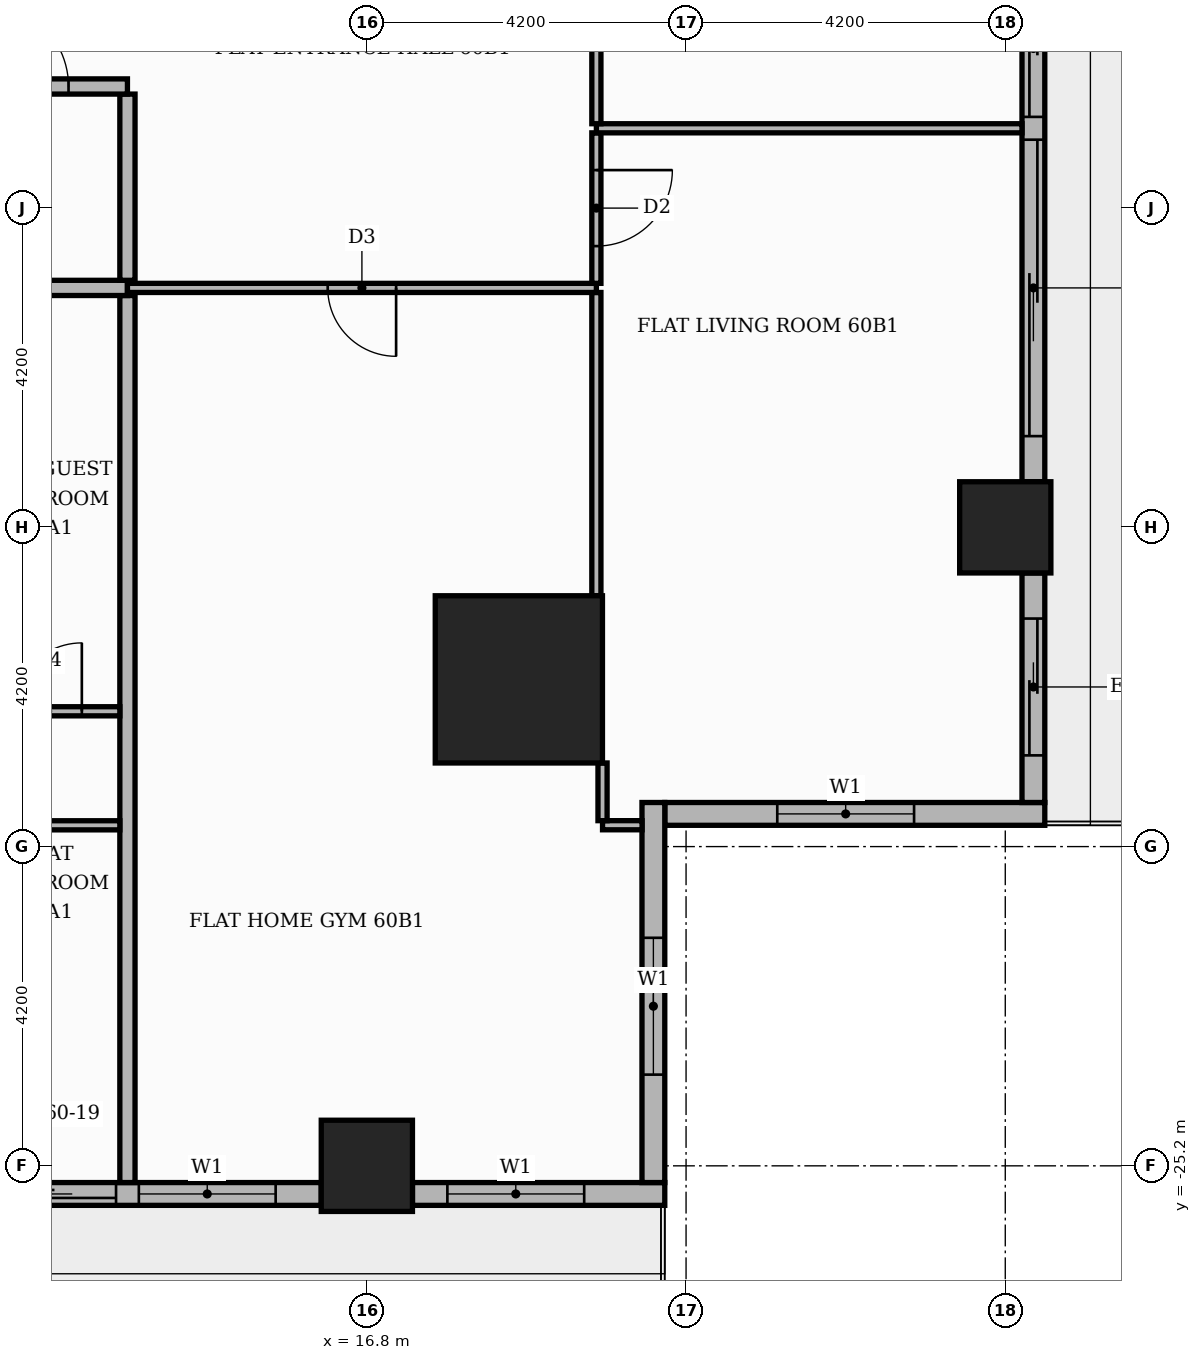
"""IFC4 building model, lengths in metres.
Left out: names, types, materials, properties, quantities, classifications, styles, units other than length and angle.
Written with IfcOpenShell. Run it as: python <this file> out.ifc"""

import sys

from ifc_helpers import new_model, si_unit, direction, frame, frame_2d, origin, origin_2d, place, context, subcontext, project, spatial, rectangle, extrude, element, fill, save


model = new_model("IFC4")
c1 = context("Model", 3, precision=1e-05, world=origin(), true_north=direction((0.0, 1.0)))
c2 = subcontext(c1, "Body", "Model", "MODEL_VIEW")
j1 = project(units=[si_unit("LENGTHUNIT", "METRE"), si_unit("PLANEANGLEUNIT", "RADIAN")], contexts=[c1])
p1 = place(None, origin())
s1 = spatial("IfcSite", under=j1, at=p1, CompositionType="ELEMENT")
p2 = place(p1, origin())
s2 = spatial("IfcBuilding", under=s1, at=p2, CompositionType="ELEMENT")
p3 = place(p2, frame((0.0, 0.0, 252.3)))
s3 = spatial("IfcBuildingStorey", under=s2, at=p3, CompositionType="ELEMENT", Elevation=252.3)
p4 = place(p3, frame((18.8, -18.8, 0.0), z_axis=(0.0, 0.0, 1.0), x_axis=(1.0, 0.0, 0.0)))
e1 = element("IfcColumn", 1, at=p4, inside=s3, PredefinedType="COLUMN", context=c2, shape_type="SweptSolid", body=[
    extrude(rectangle(XDim=2.2, YDim=2.2, at=origin_2d()), origin(), (0.0, 0.0, 1.0), 3.9),
])
for number, where, z_axis, x_axis in (
    (2, (25.2, -16.8, 0.0), (0.0, 0.0, 1.0), (1.0, 0.0, 0.0)),
    (3, (16.8, -25.2, 0.0), (0.0, 0.0, 1.0), (1.0, 0.0, 0.0)),
):
    element("IfcColumn", number, at=place(p3, frame(where, z_axis=z_axis, x_axis=x_axis)), inside=s3, PredefinedType="COLUMN", context=c2, shape_type="SweptSolid", body=[
        extrude(rectangle(XDim=1.2, YDim=1.2, at=origin_2d()), origin(), (0.0, 0.0, 1.0), 3.9),
    ])
p5 = place(p3, frame((20.72, -20.57, 0.0), z_axis=(0.0, 0.0, 1.0), x_axis=(1.0, 0.0, 0.0)))
e4 = element("IfcWall", 4, at=p5, inside=s3, PredefinedType="STANDARD", context=c2, shape_type="SweptSolid", body=[
    extrude(rectangle(XDim=5.0, YDim=0.3, at=frame_2d((2.5, 0.0))), origin(), (0.0, 0.0, 1.0), 3.48),
])
p6 = place(p5, frame((1.48, 0.0, 0.9)))
e5 = element("IfcOpeningElement", 5, at=p6, cuts=e4, PredefinedType="OPENING", context=c2, shape_type="SweptSolid", body=[
    extrude(rectangle(XDim=1.8, YDim=2.1, at=frame_2d((0.9, 1.05))), frame((0.0, 0.16, 0.0), z_axis=(0.0, -1.0, 0.0), x_axis=(1.0, 0.0, 0.0)), (0.0, 0.0, 1.0), 0.32),
])
p7 = place(p3, frame((25.57, -20.42, 0.0), z_axis=(0.0, 0.0, 1.0), x_axis=(0.0, 1.0, 0.0)))
e6 = element("IfcWall", 6, at=p7, inside=s3, PredefinedType="STANDARD", context=c2, shape_type="SweptSolid", body=[
    extrude(rectangle(XDim=3.02, YDim=0.3, at=frame_2d((1.51, 0.0))), origin(), (0.0, 0.0, 1.0), 3.48),
])
p8 = place(p7, frame((0.62, 0.0, 0.0)))
e7 = element("IfcOpeningElement", 7, at=p8, cuts=e6, PredefinedType="OPENING", context=c2, shape_type="SweptSolid", body=[
    extrude(rectangle(XDim=1.8, YDim=2.4, at=frame_2d((0.9, 1.2))), frame((0.0, 0.16, 0.0), z_axis=(0.0, -1.0, 0.0), x_axis=(1.0, 0.0, 0.0)), (0.0, 0.0, 1.0), 0.32),
])
p9 = place(p3, frame((25.57, -16.2, 0.0), z_axis=(0.0, 0.0, 1.0), x_axis=(0.0, 1.0, 0.0)))
e8 = element("IfcWall", 8, at=p9, inside=s3, PredefinedType="STANDARD", context=c2, shape_type="SweptSolid", body=[
    extrude(rectangle(XDim=7.2, YDim=0.3, at=frame_2d((3.6, 0.0))), origin(), (0.0, 0.0, 1.0), 3.48),
])
p10 = place(p9, frame((0.6, 0.0, 0.0)))
e9 = element("IfcOpeningElement", 9, at=p10, cuts=e8, PredefinedType="OPENING", context=c2, shape_type="SweptSolid", body=[
    extrude(rectangle(XDim=3.9, YDim=2.4, at=frame_2d((1.95, 1.2))), frame((0.0, 0.16, 0.0), z_axis=(0.0, -1.0, 0.0), x_axis=(1.0, 0.0, 0.0)), (0.0, 0.0, 1.0), 0.32),
])
p11 = place(p9, frame((4.8, 0.0, 0.0)))
e10 = element("IfcOpeningElement", 10, at=p11, cuts=e8, PredefinedType="OPENING", context=c2, shape_type="SweptSolid", body=[
    extrude(rectangle(XDim=1.8, YDim=2.4, at=frame_2d((0.9, 1.2))), frame((0.0, 0.16, 0.0), z_axis=(0.0, -1.0, 0.0), x_axis=(1.0, 0.0, 0.0)), (0.0, 0.0, 1.0), 0.32),
])
p12 = place(p3, frame((9.0, -25.57, 0.0), z_axis=(0.0, 0.0, 1.0), x_axis=(1.0, 0.0, 0.0)))
e11 = element("IfcWall", 11, at=p12, inside=s3, PredefinedType="STANDARD", context=c2, shape_type="SweptSolid", body=[
    extrude(rectangle(XDim=7.2, YDim=0.3, at=frame_2d((3.6, 0.0))), origin(), (0.0, 0.0, 1.0), 3.48),
])
p13 = place(p12, frame((0.6, 0.0, 0.9)))
e12 = element("IfcOpeningElement", 12, at=p13, cuts=e11, PredefinedType="OPENING", context=c2, shape_type="SweptSolid", body=[
    extrude(rectangle(XDim=1.8, YDim=2.1, at=frame_2d((0.9, 1.05))), frame((0.0, 0.16, 0.0), z_axis=(0.0, -1.0, 0.0), x_axis=(1.0, 0.0, 0.0)), (0.0, 0.0, 1.0), 0.32),
])
p14 = place(p12, frame((2.7, 0.0, 0.0)))
e13 = element("IfcOpeningElement", 13, at=p14, cuts=e11, PredefinedType="OPENING", context=c2, shape_type="SweptSolid", body=[
    extrude(rectangle(XDim=1.8, YDim=2.4, at=frame_2d((0.9, 1.2))), frame((0.0, 0.16, 0.0), z_axis=(0.0, -1.0, 0.0), x_axis=(1.0, 0.0, 0.0)), (0.0, 0.0, 1.0), 0.32),
])
p15 = place(p12, frame((4.8, 0.0, 0.9)))
e14 = element("IfcOpeningElement", 14, at=p15, cuts=e11, PredefinedType="OPENING", context=c2, shape_type="SweptSolid", body=[
    extrude(rectangle(XDim=1.8, YDim=2.1, at=frame_2d((0.9, 1.05))), frame((0.0, 0.16, 0.0), z_axis=(0.0, -1.0, 0.0), x_axis=(1.0, 0.0, 0.0)), (0.0, 0.0, 1.0), 0.32),
])
p16 = place(p3, frame((17.4, -25.57, 0.0), z_axis=(0.0, 0.0, 1.0), x_axis=(1.0, 0.0, 0.0)))
e15 = element("IfcWall", 15, at=p16, inside=s3, PredefinedType="STANDARD", context=c2, shape_type="SweptSolid", body=[
    extrude(rectangle(XDim=3.32, YDim=0.3, at=frame_2d((1.66, 0.0))), origin(), (0.0, 0.0, 1.0), 3.48),
])
p17 = place(p16, frame((0.459, 0.0, 0.9)))
e16 = element("IfcOpeningElement", 16, at=p17, cuts=e15, PredefinedType="OPENING", context=c2, shape_type="SweptSolid", body=[
    extrude(rectangle(XDim=1.8, YDim=2.1, at=frame_2d((0.9, 1.05))), frame((0.0, 0.16, 0.0), z_axis=(0.0, -1.0, 0.0), x_axis=(1.0, 0.0, 0.0)), (0.0, 0.0, 1.0), 0.32),
])
p18 = place(p3, frame((20.57, -25.42, 0.0), z_axis=(0.0, 0.0, 1.0), x_axis=(0.0, 1.0, 0.0)))
e17 = element("IfcWall", 17, at=p18, inside=s3, PredefinedType="STANDARD", context=c2, shape_type="SweptSolid", body=[
    extrude(rectangle(XDim=5.0, YDim=0.3, at=frame_2d((2.5, 0.0))), origin(), (0.0, 0.0, 1.0), 3.48),
])
p19 = place(p18, frame((1.42, 0.0, 0.9)))
e18 = element("IfcOpeningElement", 18, at=p19, cuts=e17, PredefinedType="OPENING", context=c2, shape_type="SweptSolid", body=[
    extrude(rectangle(XDim=1.8, YDim=2.1, at=frame_2d((0.9, 1.05))), frame((0.0, 0.16, 0.0), z_axis=(0.0, -1.0, 0.0), x_axis=(1.0, 0.0, 0.0)), (0.0, 0.0, 1.0), 0.32),
])
p20 = place(p3, frame((13.65, -25.42, 0.0), z_axis=(0.0, 0.0, 1.0), x_axis=(0.0, 1.0, 0.0)))
e19 = element("IfcWall", 19, at=p20, inside=s3, PredefinedType="PARTITIONING", context=c2, shape_type="SweptSolid", body=[
    extrude(rectangle(XDim=11.67, YDim=0.2, at=frame_2d((5.835, 0.0))), origin(), (0.0, 0.0, 1.0), 3.48),
])
p21 = place(p3, frame((5.55, -20.72, 0.0), z_axis=(0.0, 0.0, 1.0), x_axis=(1.0, 0.0, 0.0)))
e20 = element("IfcWall", 20, at=p21, inside=s3, PredefinedType="PARTITIONING", context=c2, shape_type="SweptSolid", body=[
    extrude(rectangle(XDim=8.0, YDim=0.12, at=frame_2d((4.0, 0.0))), origin(), (0.0, 0.0, 1.0), 3.48),
])
p22 = place(p21, frame((2.4, 0.0, 0.0)))
e21 = element("IfcOpeningElement", 21, at=p22, cuts=e20, PredefinedType="OPENING", context=c2, shape_type="SweptSolid", body=[
    extrude(rectangle(XDim=0.9, YDim=2.1, at=frame_2d((0.45, 1.05))), frame((0.0, 0.07, 0.0), z_axis=(0.0, -1.0, 0.0), x_axis=(1.0, 0.0, 0.0)), (0.0, 0.0, 1.0), 0.14),
])
p23 = place(p3, frame((19.901, -20.719, 0.0), z_axis=(0.0, 0.0, 1.0), x_axis=(1.0, 0.0, 0.0)))
e22 = element("IfcWall", 22, at=p23, inside=s3, PredefinedType="PARTITIONING", context=c2, shape_type="SweptSolid", body=[
    extrude(rectangle(XDim=0.52, YDim=0.12, at=frame_2d((0.26, 0.0))), origin(), (0.0, 0.0, 1.0), 3.48),
])
p24 = place(p3, frame((19.901, -20.659, 0.0), z_axis=(0.0, 0.0, 1.0), x_axis=(0.0, 1.0, 0.0)))
e23 = element("IfcWall", 23, at=p24, inside=s3, PredefinedType="PARTITIONING", context=c2, shape_type="SweptSolid", body=[
    extrude(rectangle(XDim=0.759, YDim=0.12, at=frame_2d((0.379, 0.0))), origin(), (0.0, 0.0, 1.0), 3.48),
])
p25 = place(p3, frame((-7.35, -19.22, 0.0), z_axis=(0.0, 0.0, 1.0), x_axis=(1.0, 0.0, 0.0)))
e24 = element("IfcWall", 24, at=p25, inside=s3, PredefinedType="PARTITIONING", context=c2, shape_type="SweptSolid", body=[
    extrude(rectangle(XDim=20.9, YDim=0.12, at=frame_2d((10.45, 0.0))), origin(), (0.0, 0.0, 1.0), 3.48),
])
p26 = place(p25, frame((2.7, 0.0, 0.0)))
e25 = element("IfcOpeningElement", 25, at=p26, cuts=e24, PredefinedType="OPENING", context=c2, shape_type="SweptSolid", body=[
    extrude(rectangle(XDim=0.9, YDim=2.1, at=frame_2d((0.45, 1.05))), frame((0.0, 0.07, 0.0), z_axis=(0.0, -1.0, 0.0), x_axis=(1.0, 0.0, 0.0)), (0.0, 0.0, 1.0), 0.14),
])
p27 = place(p25, frame((7.95, 0.0, 0.0)))
e26 = element("IfcOpeningElement", 26, at=p27, cuts=e24, PredefinedType="OPENING", context=c2, shape_type="SweptSolid", body=[
    extrude(rectangle(XDim=0.9, YDim=2.1, at=frame_2d((0.45, 1.05))), frame((0.0, 0.07, 0.0), z_axis=(0.0, -1.0, 0.0), x_axis=(1.0, 0.0, 0.0)), (0.0, 0.0, 1.0), 0.14),
])
p28 = place(p25, frame((13.05, 0.0, 0.0)))
e27 = element("IfcOpeningElement", 27, at=p28, cuts=e24, PredefinedType="OPENING", context=c2, shape_type="SweptSolid", body=[
    extrude(rectangle(XDim=0.9, YDim=2.1, at=frame_2d((0.45, 1.05))), frame((0.0, 0.07, 0.0), z_axis=(0.0, -1.0, 0.0), x_axis=(1.0, 0.0, 0.0)), (0.0, 0.0, 1.0), 0.14),
])
p29 = place(p25, frame((17.25, 0.0, 0.0)))
e28 = element("IfcOpeningElement", 28, at=p29, cuts=e24, PredefinedType="OPENING", context=c2, shape_type="SweptSolid", body=[
    extrude(rectangle(XDim=0.9, YDim=2.1, at=frame_2d((0.45, 1.05))), frame((0.0, 0.07, 0.0), z_axis=(0.0, -1.0, 0.0), x_axis=(1.0, 0.0, 0.0)), (0.0, 0.0, 1.0), 0.14),
])
p30 = place(p25, frame((19.5, 0.0, 0.0)))
e29 = element("IfcOpeningElement", 29, at=p30, cuts=e24, PredefinedType="OPENING", context=c2, shape_type="SweptSolid", body=[
    extrude(rectangle(XDim=0.9, YDim=2.1, at=frame_2d((0.45, 1.05))), frame((0.0, 0.07, 0.0), z_axis=(0.0, -1.0, 0.0), x_axis=(1.0, 0.0, 0.0)), (0.0, 0.0, 1.0), 0.14),
])
p31 = place(p3, frame((19.82, -17.7, 0.0), z_axis=(0.0, 0.0, 1.0), x_axis=(0.0, 1.0, 0.0)))
e30 = element("IfcWall", 30, at=p31, inside=s3, PredefinedType="PARTITIONING", context=c2, shape_type="SweptSolid", body=[
    extrude(rectangle(XDim=3.99, YDim=0.12, at=frame_2d((1.995, 0.0))), origin(), (0.0, 0.0, 1.0), 3.48),
])
p32 = place(p3, frame((-25.42, -13.65, 0.0), z_axis=(0.0, 0.0, 1.0), x_axis=(1.0, 0.0, 0.0)))
e31 = element("IfcWall", 31, at=p32, inside=s3, PredefinedType="PARTITIONING", context=c2, shape_type="SweptSolid", body=[
    extrude(rectangle(XDim=39.07, YDim=0.2, at=frame_2d((19.535, 0.0))), origin(), (0.0, 0.0, 1.0), 3.48),
])
p33 = place(p32, frame((14.37, 0.0, 0.0)))
e32 = element("IfcOpeningElement", 32, at=p33, cuts=e31, PredefinedType="OPENING", context=c2, shape_type="SweptSolid", body=[
    extrude(rectangle(XDim=1.1, YDim=2.4, at=frame_2d((0.55, 1.2))), frame((0.0, 0.11, 0.0), z_axis=(0.0, -1.0, 0.0), x_axis=(1.0, 0.0, 0.0)), (0.0, 0.0, 1.0), 0.22),
])
p34 = place(p3, frame((13.65, -13.65, 0.0), z_axis=(0.0, 0.0, 1.0), x_axis=(1.0, 0.0, 0.0)))
e33 = element("IfcWall", 33, at=p34, inside=s3, PredefinedType="PARTITIONING", context=c2, shape_type="SweptSolid", body=[
    extrude(rectangle(XDim=6.17, YDim=0.12, at=frame_2d((3.085, 0.0))), origin(), (0.0, 0.0, 1.0), 3.48),
])
p35 = place(p34, frame((2.635, 0.0, 0.0)))
e34 = element("IfcOpeningElement", 34, at=p35, cuts=e33, PredefinedType="OPENING", context=c2, shape_type="SweptSolid", body=[
    extrude(rectangle(XDim=0.9, YDim=2.1, at=frame_2d((0.45, 1.05))), frame((0.0, 0.07, 0.0), z_axis=(0.0, -1.0, 0.0), x_axis=(1.0, 0.0, 0.0)), (0.0, 0.0, 1.0), 0.14),
])
p36 = place(p3, frame((19.82, -13.59, 0.0), z_axis=(0.0, 0.0, 1.0), x_axis=(0.0, 1.0, 0.0)))
e35 = element("IfcWall", 35, at=p36, inside=s3, PredefinedType="PARTITIONING", context=c2, shape_type="SweptSolid", body=[
    extrude(rectangle(XDim=1.98, YDim=0.12, at=frame_2d((0.99, 0.0))), origin(), (0.0, 0.0, 1.0), 3.48),
])
p37 = place(p36, frame((0.49, 0.0, 0.0)))
e36 = element("IfcOpeningElement", 36, at=p37, cuts=e35, PredefinedType="OPENING", context=c2, shape_type="SweptSolid", body=[
    extrude(rectangle(XDim=1.0, YDim=2.1, at=frame_2d((0.5, 1.05))), frame((0.0, 0.07, 0.0), z_axis=(0.0, -1.0, 0.0), x_axis=(1.0, 0.0, 0.0)), (0.0, 0.0, 1.0), 0.14),
])
p38 = place(p3, frame((13.65, -13.55, 0.0), z_axis=(0.0, 0.0, 1.0), x_axis=(0.0, 1.0, 0.0)))
e37 = element("IfcWall", 37, at=p38, inside=s3, PredefinedType="PARTITIONING", context=c2, shape_type="SweptSolid", body=[
    extrude(rectangle(XDim=2.45, YDim=0.2, at=frame_2d((1.225, 0.0))), origin(), (0.0, 0.0, 1.0), 3.48),
])
p39 = place(p3, frame((19.82, -11.55, 0.0), z_axis=(0.0, 0.0, 1.0), x_axis=(1.0, 0.0, 0.0)))
e38 = element("IfcWall", 38, at=p39, inside=s3, PredefinedType="PARTITIONING", context=c2, shape_type="SweptSolid", body=[
    extrude(rectangle(XDim=5.6, YDim=0.12, at=frame_2d((2.8, 0.0))), origin(), (0.0, 0.0, 1.0), 3.48),
])
p40 = place(p3, frame((19.82, -11.49, 0.0), z_axis=(0.0, 0.0, 1.0), x_axis=(0.0, 1.0, 0.0)))
e39 = element("IfcWall", 39, at=p40, inside=s3, PredefinedType="PARTITIONING", context=c2, shape_type="SweptSolid", body=[
    extrude(rectangle(XDim=8.28, YDim=0.12, at=frame_2d((4.14, 0.0))), origin(), (0.0, 0.0, 1.0), 3.48),
])
p41 = place(p40, frame((3.64, 0.0, 0.0)))
e40 = element("IfcOpeningElement", 40, at=p41, cuts=e39, PredefinedType="OPENING", context=c2, shape_type="SweptSolid", body=[
    extrude(rectangle(XDim=1.0, YDim=2.1, at=frame_2d((0.5, 1.05))), frame((0.0, 0.07, 0.0), z_axis=(0.0, -1.0, 0.0), x_axis=(1.0, 0.0, 0.0)), (0.0, 0.0, 1.0), 0.14),
])
p42 = place(p3, frame((11.0, -11.0, 0.0), z_axis=(0.0, 0.0, 1.0), x_axis=(1.0, 0.0, 0.0)))
e41 = element("IfcWall", 41, at=p42, inside=s3, PredefinedType="PARTITIONING", context=c2, shape_type="SweptSolid", body=[
    extrude(rectangle(XDim=2.65, YDim=0.2, at=frame_2d((1.325, 0.0))), origin(), (0.0, 0.0, 1.0), 3.48),
])
p43 = place(p42, frame((0.775, 0.0, 0.0)))
e42 = element("IfcOpeningElement", 42, at=p43, cuts=e41, PredefinedType="OPENING", context=c2, shape_type="SweptSolid", body=[
    extrude(rectangle(XDim=1.1, YDim=2.4, at=frame_2d((0.55, 1.2))), frame((0.0, 0.11, 0.0), z_axis=(0.0, -1.0, 0.0), x_axis=(1.0, 0.0, 0.0)), (0.0, 0.0, 1.0), 0.22),
])
p44 = place(p6, origin())
e43 = element("IfcWindow", 43, at=p44, inside=s3, PartitioningType="SINGLE_PANEL", PredefinedType="WINDOW", context=c2, shape_type="SweptSolid", body=[
    extrude(rectangle(XDim=1.8, YDim=2.1, at=frame_2d((0.9, 1.05))), frame((0.0, 0.03, 0.0), z_axis=(0.0, -1.0, 0.0), x_axis=(1.0, 0.0, 0.0)), (0.0, 0.0, 1.0), 0.06),
])
fill(e5, e43)
p45 = place(p8, origin())
e44 = element("IfcDoor", 44, at=p45, inside=s3, OperationType="SLIDING_TO_RIGHT", PredefinedType="DOOR", context=c2, shape_type="SweptSolid", body=[
    extrude(rectangle(XDim=1.8, YDim=2.4, at=frame_2d((0.9, 1.2))), frame((0.0, 0.025, 0.0), z_axis=(0.0, -1.0, 0.0), x_axis=(1.0, 0.0, 0.0)), (0.0, 0.0, 1.0), 0.05),
])
fill(e7, e44)
p46 = place(p10, origin())
e45 = element("IfcDoor", 45, at=p46, inside=s3, OperationType="SLIDING_TO_LEFT", PredefinedType="DOOR", context=c2, shape_type="SweptSolid", body=[
    extrude(rectangle(XDim=3.9, YDim=2.4, at=frame_2d((1.95, 1.2))), frame((0.0, 0.025, 0.0), z_axis=(0.0, -1.0, 0.0), x_axis=(1.0, 0.0, 0.0)), (0.0, 0.0, 1.0), 0.05),
])
fill(e9, e45)
p47 = place(p11, origin())
e46 = element("IfcDoor", 46, at=p47, inside=s3, OperationType="SLIDING_TO_RIGHT", PredefinedType="DOOR", context=c2, shape_type="SweptSolid", body=[
    extrude(rectangle(XDim=1.8, YDim=2.4, at=frame_2d((0.9, 1.2))), frame((0.0, 0.025, 0.0), z_axis=(0.0, -1.0, 0.0), x_axis=(1.0, 0.0, 0.0)), (0.0, 0.0, 1.0), 0.05),
])
fill(e10, e46)
p48 = place(p14, origin())
e47 = element("IfcDoor", 47, at=p48, inside=s3, OperationType="SLIDING_TO_RIGHT", PredefinedType="DOOR", context=c2, shape_type="SweptSolid", body=[
    extrude(rectangle(XDim=1.8, YDim=2.4, at=frame_2d((0.9, 1.2))), frame((0.0, 0.025, 0.0), z_axis=(0.0, -1.0, 0.0), x_axis=(1.0, 0.0, 0.0)), (0.0, 0.0, 1.0), 0.05),
])
fill(e13, e47)
p49 = place(p15, origin())
e48 = element("IfcWindow", 48, at=p49, inside=s3, PartitioningType="SINGLE_PANEL", PredefinedType="WINDOW", context=c2, shape_type="SweptSolid", body=[
    extrude(rectangle(XDim=1.8, YDim=2.1, at=frame_2d((0.9, 1.05))), frame((0.0, 0.03, 0.0), z_axis=(0.0, -1.0, 0.0), x_axis=(1.0, 0.0, 0.0)), (0.0, 0.0, 1.0), 0.06),
])
fill(e14, e48)
p50 = place(p17, origin())
e49 = element("IfcWindow", 49, at=p50, inside=s3, PartitioningType="SINGLE_PANEL", PredefinedType="WINDOW", context=c2, shape_type="SweptSolid", body=[
    extrude(rectangle(XDim=1.8, YDim=2.1, at=frame_2d((0.9, 1.05))), frame((0.0, 0.03, 0.0), z_axis=(0.0, -1.0, 0.0), x_axis=(1.0, 0.0, 0.0)), (0.0, 0.0, 1.0), 0.06),
])
fill(e16, e49)
p51 = place(p19, origin())
e50 = element("IfcWindow", 50, at=p51, inside=s3, PartitioningType="SINGLE_PANEL", PredefinedType="WINDOW", context=c2, shape_type="SweptSolid", body=[
    extrude(rectangle(XDim=1.8, YDim=2.1, at=frame_2d((0.9, 1.05))), frame((0.0, 0.03, 0.0), z_axis=(0.0, -1.0, 0.0), x_axis=(1.0, 0.0, 0.0)), (0.0, 0.0, 1.0), 0.06),
])
fill(e18, e50)
p52 = place(p30, origin())
e51 = element("IfcDoor", 51, at=p52, inside=s3, OperationType="SINGLE_SWING_RIGHT", PredefinedType="DOOR", context=c2, shape_type="SweptSolid", body=[
    extrude(rectangle(XDim=0.9, YDim=2.1, at=frame_2d((0.45, 1.05))), frame((0.0, 0.025, 0.0), z_axis=(0.0, -1.0, 0.0), x_axis=(1.0, 0.0, 0.0)), (0.0, 0.0, 1.0), 0.05),
])
fill(e29, e51)
p53 = place(p43, origin())
e52 = element("IfcDoor", 52, at=p53, inside=s3, OperationType="SINGLE_SWING_LEFT", PredefinedType="DOOR", context=c2, shape_type="SweptSolid", body=[
    extrude(rectangle(XDim=1.1, YDim=2.4, at=frame_2d((0.55, 1.2))), frame((0.0, 0.025, 0.0), z_axis=(0.0, -1.0, 0.0), x_axis=(1.0, 0.0, 0.0)), (0.0, 0.0, 1.0), 0.05),
])
fill(e42, e52)
p54 = place(p35, frame((0.9, 0.0, 0.0), z_axis=(0.0, 0.0, 1.0), x_axis=(-1.0, 0.0, 0.0)))
e53 = element("IfcDoor", 53, at=p54, inside=s3, OperationType="SINGLE_SWING_RIGHT", PredefinedType="DOOR", context=c2, shape_type="SweptSolid", body=[
    extrude(rectangle(XDim=0.9, YDim=2.1, at=frame_2d((0.45, 1.05))), frame((0.0, 0.025, 0.0), z_axis=(0.0, -1.0, 0.0), x_axis=(1.0, 0.0, 0.0)), (0.0, 0.0, 1.0), 0.05),
])
fill(e34, e53)
p55 = place(p37, frame((1.0, 0.0, 0.0), z_axis=(0.0, 0.0, 1.0), x_axis=(-1.0, 0.0, 0.0)))
e54 = element("IfcDoor", 54, at=p55, inside=s3, OperationType="SINGLE_SWING_RIGHT", PredefinedType="DOOR", context=c2, shape_type="SweptSolid", body=[
    extrude(rectangle(XDim=1.0, YDim=2.1, at=frame_2d((0.5, 1.05))), frame((0.0, 0.025, 0.0), z_axis=(0.0, -1.0, 0.0), x_axis=(1.0, 0.0, 0.0)), (0.0, 0.0, 1.0), 0.05),
])
fill(e36, e54)
save(model, sys.argv[1])
